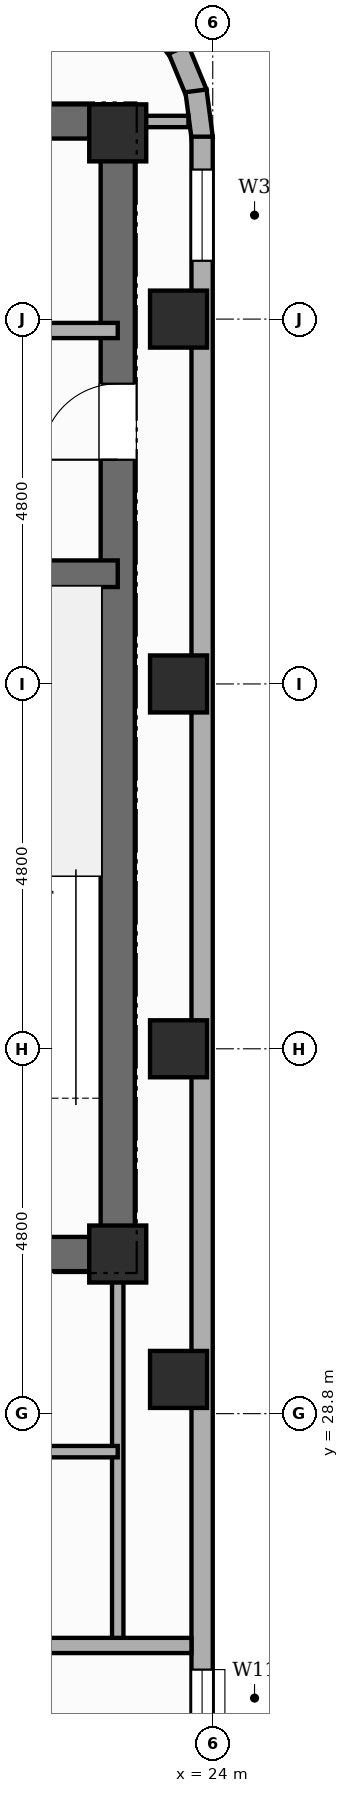
"""IFC4 building model, lengths in metres.
Left out: names, types, materials, properties, quantities, classifications, styles, units other than length and angle.
Written with IfcOpenShell. Run it as: python <this file> out.ifc"""

import sys

from ifc_helpers import new_model, si_unit, direction, frame, frame_2d, origin, origin_2d, place, context, subcontext, project, spatial, rectangle, extrude, element, fill, save


model = new_model("IFC4")
c1 = context("Model", 3, precision=1e-05, world=origin(), true_north=direction((0.0, 1.0)))
c2 = subcontext(c1, "Body", "Model", "MODEL_VIEW")
j1 = project(units=[si_unit("LENGTHUNIT", "METRE"), si_unit("PLANEANGLEUNIT", "RADIAN")], contexts=[c1])
p1 = place(None, origin())
s1 = spatial("IfcSite", under=j1, at=p1, CompositionType="ELEMENT")
p2 = place(p1, origin())
s2 = spatial("IfcBuilding", under=s1, at=p2, CompositionType="ELEMENT")
p3 = place(p2, frame((0.0, 0.0, 265.6)))
s3 = spatial("IfcBuildingStorey", under=s2, at=p3, CompositionType="ELEMENT", Elevation=265.6)
p4 = place(p3, frame((22.75, 30.675, 0.0), z_axis=(0.0, 0.0, 1.0), x_axis=(0.0, 1.0, 0.0)))
e1 = element("IfcWall", 1, at=p4, inside=s3, PredefinedType="SHEAR", context=c2, shape_type="SweptSolid", body=[
    extrude(rectangle(XDim=15.35, YDim=0.45, at=frame_2d((7.675, 0.0))), origin(), (0.0, 0.0, 1.0), 4.3),
])
p5 = place(p4, frame((10.675, 0.0, 0.0)))
e2 = element("IfcOpeningElement", 2, at=p5, cuts=e1, PredefinedType="OPENING", context=c2, shape_type="SweptSolid", body=[
    extrude(rectangle(XDim=1.0, YDim=2.15, at=frame_2d((0.5, 1.075))), frame((0.0, 0.235, 0.0), z_axis=(0.0, -1.0, 0.0), x_axis=(1.0, 0.0, 0.0)), (0.0, 0.0, 1.0), 0.47),
])
p6 = place(p3, frame((6.05, 45.8, 0.0), z_axis=(0.0, 0.0, 1.0), x_axis=(1.0, 0.0, 0.0)))
e3 = element("IfcWall", 3, at=p6, inside=s3, PredefinedType="SHEAR", context=c2, shape_type="SweptSolid", body=[
    extrude(rectangle(XDim=16.7, YDim=0.45, at=frame_2d((8.35, 0.0))), origin(), (0.0, 0.0, 1.0), 4.3),
])
p7 = place(p6, frame((13.57, 0.0, 0.0)))
e4 = element("IfcOpeningElement", 4, at=p7, cuts=e3, PredefinedType="OPENING", context=c2, shape_type="SweptSolid", body=[
    extrude(rectangle(XDim=0.95, YDim=2.15, at=frame_2d((0.475, 1.075))), frame((0.0, 0.235, 0.0), z_axis=(0.0, -1.0, 0.0), x_axis=(1.0, 0.0, 0.0)), (0.0, 0.0, 1.0), 0.47),
])
p8 = place(p3, frame((18.84, 30.9, 0.0), z_axis=(0.0, 0.0, 1.0), x_axis=(1.0, 0.0, 0.0)))
e5 = element("IfcWall", 5, at=p8, inside=s3, PredefinedType="SHEAR", context=c2, shape_type="SweptSolid", body=[
    extrude(rectangle(XDim=3.91, YDim=0.45, at=frame_2d((1.955, 0.0))), origin(), (0.0, 0.0, 1.0), 4.3),
])
p9 = place(p3, frame((18.84, 39.85, 0.0), z_axis=(0.0, 0.0, 1.0), x_axis=(1.0, 0.0, 0.0)))
e6 = element("IfcWall", 6, at=p9, inside=s3, PredefinedType="SHEAR", context=c2, shape_type="SweptSolid", body=[
    extrude(rectangle(XDim=3.91, YDim=0.35, at=frame_2d((1.955, 0.0))), origin(), (0.0, 0.0, 1.0), 4.3),
])
for number, where, z_axis, x_axis in (
    (7, (22.75, 30.9, 0.0), (0.0, 0.0, 1.0), (1.0, 0.0, 0.0)),
    (8, (22.75, 45.65, 0.0), (0.0, 0.0, 1.0), (1.0, 0.0, 0.0)),
    (9, (23.55, 29.25, 0.0), (0.0, 0.0, 1.0), (1.0, 0.0, 0.0)),
    (10, (23.55, 33.6, 0.0), (0.0, 0.0, 1.0), (1.0, 0.0, 0.0)),
    (11, (23.55, 38.4, 0.0), (0.0, 0.0, 1.0), (1.0, 0.0, 0.0)),
    (12, (23.55, 43.2, 0.0), (0.0, 0.0, 1.0), (1.0, 0.0, 0.0)),
):
    element("IfcColumn", number, at=place(p3, frame(where, z_axis=z_axis, x_axis=x_axis)), inside=s3, PredefinedType="COLUMN", context=c2, shape_type="SweptSolid", body=[
        extrude(rectangle(XDim=0.75, YDim=0.75, at=origin_2d()), origin(), (0.0, 0.0, 1.0), 4.3),
    ])
for number, where, z_axis, x_axis in (
    (13, (23.186, 47.212, 0.0), (0.0, 0.0, 1.0), (0.609, -0.793, 0.0)),
    (14, (23.549, 46.746, 0.0), (0.0, 0.0, 1.0), (0.382, -0.924, 0.0)),
    (15, (23.779, 46.203, 0.0), (0.0, 0.0, 1.0), (0.131, -0.991, 0.0)),
):
    element("IfcWall", number, at=place(p3, frame(where, z_axis=z_axis, x_axis=x_axis)), inside=s3, PredefinedType="STANDARD", context=c2, shape_type="SweptSolid", body=[
        extrude(rectangle(XDim=0.626, YDim=0.28, at=frame_2d((0.313, 0.0))), origin(), (0.0, 0.0, 1.0), 3.32),
    ])
p10 = place(p3, frame((23.86, 45.6, 0.0), z_axis=(0.0, 0.0, 1.0), x_axis=(0.0, -1.0, 0.0)))
e16 = element("IfcWall", 16, at=p10, inside=s3, PredefinedType="STANDARD", context=c2, shape_type="SweptSolid", body=[
    extrude(rectangle(XDim=32.4, YDim=0.28, at=frame_2d((16.2, 0.0))), origin(), (0.0, 0.0, 1.0), 3.32),
])
p11 = place(p10, frame((28.5, 0.0, 0.0)))
e17 = element("IfcOpeningElement", 17, at=p11, cuts=e16, PredefinedType="OPENING", context=c2, shape_type="SweptSolid", body=[
    extrude(rectangle(XDim=1.1, YDim=2.15, at=frame_2d((0.55, 1.075))), frame((0.0, 0.15, 0.0), z_axis=(0.0, -1.0, 0.0), x_axis=(1.0, 0.0, 0.0)), (0.0, 0.0, 1.0), 0.3),
])
p12 = place(p10, frame((29.95, 0.0, 0.45)))
e18 = element("IfcOpeningElement", 18, at=p12, cuts=e16, PredefinedType="OPENING", context=c2, shape_type="SweptSolid", body=[
    extrude(rectangle(XDim=0.6, YDim=1.8, at=frame_2d((0.3, 0.9))), frame((0.0, 0.15, 0.0), z_axis=(0.0, -1.0, 0.0), x_axis=(1.0, 0.0, 0.0)), (0.0, 0.0, 1.0), 0.3),
])
p13 = place(p10, frame((22.829, 0.0, 0.8)))
e19 = element("IfcOpeningElement", 19, at=p13, cuts=e16, PredefinedType="OPENING", context=c2, shape_type="SweptSolid", body=[
    extrude(rectangle(XDim=2.05, YDim=1.95, at=frame_2d((1.025, 0.975))), frame((0.0, 0.15, 0.0), z_axis=(0.0, -1.0, 0.0), x_axis=(1.0, 0.0, 0.0)), (0.0, 0.0, 1.0), 0.3),
])
p14 = place(p10, frame((0.433, 0.0, 0.8)))
e20 = element("IfcOpeningElement", 20, at=p14, cuts=e16, PredefinedType="OPENING", context=c2, shape_type="SweptSolid", body=[
    extrude(rectangle(XDim=1.2, YDim=1.8, at=frame_2d((0.6, 0.9))), frame((0.0, 0.15, 0.0), z_axis=(0.0, -1.0, 0.0), x_axis=(1.0, 0.0, 0.0)), (0.0, 0.0, 1.0), 0.3),
])
p15 = place(p10, frame((27.076, 0.0, 0.45)))
e21 = element("IfcOpeningElement", 21, at=p15, cuts=e16, PredefinedType="OPENING", context=c2, shape_type="SweptSolid", body=[
    extrude(rectangle(XDim=0.75, YDim=1.8, at=frame_2d((0.375, 0.9))), frame((0.0, 0.15, 0.0), z_axis=(0.0, -1.0, 0.0), x_axis=(1.0, 0.0, 0.0)), (0.0, 0.0, 1.0), 0.3),
])
p16 = place(p10, frame((20.167, 0.0, 0.45)))
e22 = element("IfcOpeningElement", 22, at=p16, cuts=e16, PredefinedType="OPENING", context=c2, shape_type="SweptSolid", body=[
    extrude(rectangle(XDim=0.75, YDim=1.8, at=frame_2d((0.375, 0.9))), frame((0.0, 0.15, 0.0), z_axis=(0.0, -1.0, 0.0), x_axis=(1.0, 0.0, 0.0)), (0.0, 0.0, 1.0), 0.3),
])
p17 = place(p3, frame((21.02, 43.05, 0.0), z_axis=(0.0, 0.0, 1.0), x_axis=(1.0, 0.0, 0.0)))
e23 = element("IfcWall", 23, at=p17, inside=s3, PredefinedType="POLYGONAL", context=c2, shape_type="SweptSolid", body=[
    extrude(rectangle(XDim=1.73, YDim=0.2, at=frame_2d((0.865, 0.0))), origin(), (0.0, 0.0, 1.0), 3.32),
])
p18 = place(p3, frame((22.75, 25.75, 0.0), z_axis=(0.0, 0.0, 1.0), x_axis=(0.0, 1.0, 0.0)))
e24 = element("IfcWall", 24, at=p18, inside=s3, PredefinedType="PARTITIONING", context=c2, shape_type="SweptSolid", body=[
    extrude(rectangle(XDim=5.15, YDim=0.15, at=frame_2d((2.575, 0.0))), origin(), (0.0, 0.0, 1.0), 4.04),
])
p19 = place(p3, frame((15.5, 28.3, 0.0), z_axis=(0.0, 0.0, 1.0), x_axis=(1.0, 0.0, 0.0)))
e25 = element("IfcWall", 25, at=p19, inside=s3, PredefinedType="PARTITIONING", context=c2, shape_type="SweptSolid", body=[
    extrude(rectangle(XDim=7.25, YDim=0.15, at=frame_2d((3.625, 0.0))), origin(), (0.0, 0.0, 1.0), 4.04),
])
p20 = place(p3, frame((15.5, 25.75, 0.0), z_axis=(0.0, 0.0, 1.0), x_axis=(1.0, 0.0, 0.0)))
e26 = element("IfcWall", 26, at=p20, inside=s3, PredefinedType="PARTITIONING", context=c2, shape_type="SweptSolid", body=[
    extrude(rectangle(XDim=8.22, YDim=0.2, at=frame_2d((4.11, 0.0))), origin(), (0.0, 0.0, 1.0), 4.04),
])
p21 = place(p3, frame((22.75, 45.8, 0.0), z_axis=(0.0, 0.0, 1.0), x_axis=(1.0, 0.0, 0.0)))
e27 = element("IfcWall", 27, at=p21, inside=s3, PredefinedType="PARTITIONING", context=c2, shape_type="SweptSolid", body=[
    extrude(rectangle(XDim=0.93, YDim=0.15, at=frame_2d((0.465, 0.0))), origin(), (0.0, 0.0, 1.0), 4.04),
])
p22 = place(p14, origin())
e28 = element("IfcWindow", 28, at=p22, inside=s3, PartitioningType="SINGLE_PANEL", PredefinedType="WINDOW", context=c2, shape_type="SweptSolid", body=[
    extrude(rectangle(XDim=1.2, YDim=1.8, at=frame_2d((0.6, 0.9))), frame((0.0, 0.03, 0.0), z_axis=(0.0, -1.0, 0.0), x_axis=(1.0, 0.0, 0.0)), (0.0, 0.0, 1.0), 0.06),
])
fill(e20, e28)
p23 = place(p16, origin())
e29 = element("IfcWindow", 29, at=p23, inside=s3, PartitioningType="SINGLE_PANEL", PredefinedType="WINDOW", context=c2, shape_type="SweptSolid", body=[
    extrude(rectangle(XDim=0.75, YDim=1.8, at=frame_2d((0.375, 0.9))), frame((0.0, 0.03, 0.0), z_axis=(0.0, -1.0, 0.0), x_axis=(1.0, 0.0, 0.0)), (0.0, 0.0, 1.0), 0.06),
])
fill(e22, e29)
p24 = place(p5, origin())
e30 = element("IfcDoor", 30, at=p24, inside=s3, OperationType="SINGLE_SWING_LEFT", PredefinedType="DOOR", context=c2, shape_type="SweptSolid", body=[
    extrude(rectangle(XDim=1.0, YDim=2.15, at=frame_2d((0.5, 1.075))), frame((0.0, 0.025, 0.0), z_axis=(0.0, -1.0, 0.0), x_axis=(1.0, 0.0, 0.0)), (0.0, 0.0, 1.0), 0.05),
])
fill(e2, e30)
save(model, sys.argv[1])
